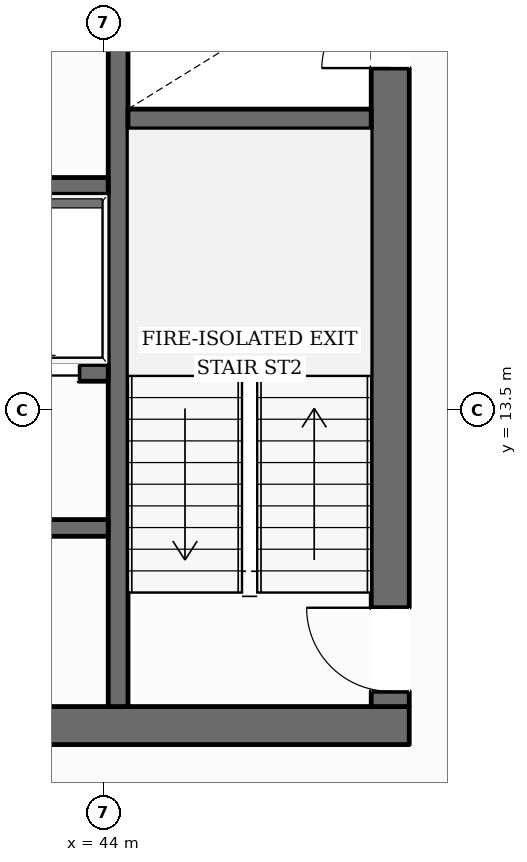
"""IFC4 building model, lengths in metres.
Left out: names, types, materials, properties, quantities, classifications, styles, units other than length and angle.
Written with IfcOpenShell. Run it as: python <this file> out.ifc"""

import sys

from ifc_helpers import new_model, si_unit, direction, frame, frame_2d, origin, place, context, subcontext, project, spatial, rectangle, extrude, element, fill, save


model = new_model("IFC4")
c1 = context("Model", 3, precision=1e-05, world=origin(), true_north=direction((0.0, 1.0)))
c2 = subcontext(c1, "Body", "Model", "MODEL_VIEW")
j1 = project(units=[si_unit("LENGTHUNIT", "METRE"), si_unit("PLANEANGLEUNIT", "RADIAN")], contexts=[c1])
p1 = place(None, origin())
s1 = spatial("IfcSite", under=j1, at=p1, CompositionType="ELEMENT")
p2 = place(p1, origin())
s2 = spatial("IfcBuilding", under=s1, at=p2, CompositionType="ELEMENT")
p3 = place(p2, frame((0.0, 0.0, 108.6)))
s3 = spatial("IfcBuildingStorey", under=s2, at=p3, CompositionType="ELEMENT", Elevation=108.6)
p4 = place(p3, frame((27.98, 9.35, 0.0), z_axis=(0.0, 0.0, 1.0), x_axis=(1.0, 0.0, 0.0)))
e1 = element("IfcWall", 1, at=p4, inside=s3, PredefinedType="SOLIDWALL", context=c2, shape_type="SweptSolid", body=[
    extrude(rectangle(XDim=20.04, YDim=0.5, at=frame_2d((10.02, 0.0))), origin(), (0.0, 0.0, 1.0), 3.6),
])
p5 = place(p4, frame((10.52, 0.0, 0.0)))
e2 = element("IfcOpeningElement", 2, at=p5, cuts=e1, PredefinedType="OPENING", context=c2, shape_type="SweptSolid", body=[
    extrude(rectangle(XDim=1.4, YDim=2.2, at=frame_2d((0.7, 1.1))), frame((0.0, 0.26, 0.0), z_axis=(0.0, -1.0, 0.0), x_axis=(1.0, 0.0, 0.0)), (0.0, 0.0, 1.0), 0.52),
])
p6 = place(p3, frame((47.77, 9.6, 0.0), z_axis=(0.0, 0.0, 1.0), x_axis=(0.0, 1.0, 0.0)))
e3 = element("IfcWall", 3, at=p6, inside=s3, PredefinedType="SOLIDWALL", context=c2, shape_type="SweptSolid", body=[
    extrude(rectangle(XDim=13.0, YDim=0.5, at=frame_2d((6.5, 0.0))), origin(), (0.0, 0.0, 1.0), 3.6),
])
p7 = place(p6, frame((0.2, 0.0, 0.0)))
e4 = element("IfcOpeningElement", 4, at=p7, cuts=e3, PredefinedType="OPENING", context=c2, shape_type="SweptSolid", body=[
    extrude(rectangle(XDim=1.1, YDim=2.15, at=frame_2d((0.55, 1.075))), frame((0.0, 0.26, 0.0), z_axis=(0.0, -1.0, 0.0), x_axis=(1.0, 0.0, 0.0)), (0.0, 0.0, 1.0), 0.52),
])
p8 = place(p6, frame((8.4, 0.0, 0.0)))
e5 = element("IfcOpeningElement", 5, at=p8, cuts=e3, PredefinedType="OPENING", context=c2, shape_type="SweptSolid", body=[
    extrude(rectangle(XDim=0.9, YDim=2.1, at=frame_2d((0.45, 1.05))), frame((0.0, 0.26, 0.0), z_axis=(0.0, -1.0, 0.0), x_axis=(1.0, 0.0, 0.0)), (0.0, 0.0, 1.0), 0.52),
])
p9 = place(p3, frame((44.19, 9.6, 0.0), z_axis=(0.0, 0.0, 1.0), x_axis=(0.0, 1.0, 0.0)))
e6 = element("IfcWall", 6, at=p9, inside=s3, PredefinedType="SHEAR", context=c2, shape_type="SweptSolid", body=[
    extrude(rectangle(XDim=13.0, YDim=0.26, at=frame_2d((6.5, 0.0))), origin(), (0.0, 0.0, 1.0), 3.6),
])
p10 = place(p9, frame((10.925, 0.0, 0.0)))
e7 = element("IfcOpeningElement", 7, at=p10, cuts=e6, PredefinedType="OPENING", context=c2, shape_type="SweptSolid", body=[
    extrude(rectangle(XDim=1.25, YDim=2.25, at=frame_2d((0.625, 1.125))), frame((0.0, 0.14, 0.0), z_axis=(0.0, -1.0, 0.0), x_axis=(1.0, 0.0, 0.0)), (0.0, 0.0, 1.0), 0.28),
])
p11 = place(p3, frame((44.32, 17.33, 0.0), z_axis=(0.0, 0.0, 1.0), x_axis=(1.0, 0.0, 0.0)))
e8 = element("IfcWall", 8, at=p11, inside=s3, PredefinedType="SHEAR", context=c2, shape_type="SweptSolid", body=[
    extrude(rectangle(XDim=3.2, YDim=0.26, at=frame_2d((1.6, 0.0))), origin(), (0.0, 0.0, 1.0), 3.6),
])
p12 = place(p3, frame((31.94, 16.45, 0.0), z_axis=(0.0, 0.0, 1.0), x_axis=(1.0, 0.0, 0.0)))
e9 = element("IfcWall", 9, at=p12, inside=s3, PredefinedType="SOLIDWALL", context=c2, shape_type="SweptSolid", body=[
    extrude(rectangle(XDim=12.12, YDim=0.22, at=frame_2d((6.06, 0.0))), origin(), (0.0, 0.0, 1.0), 3.6),
])
p13 = place(p3, frame((31.94, 13.99, 0.0), z_axis=(0.0, 0.0, 1.0), x_axis=(1.0, 0.0, 0.0)))
e10 = element("IfcWall", 10, at=p13, inside=s3, PredefinedType="SOLIDWALL", context=c2, shape_type="SweptSolid", body=[
    extrude(rectangle(XDim=12.12, YDim=0.22, at=frame_2d((6.06, 0.0))), origin(), (0.0, 0.0, 1.0), 3.6),
])
p14 = place(p13, frame((1.21, 0.0, 0.0)))
e11 = element("IfcOpeningElement", 11, at=p14, cuts=e10, PredefinedType="OPENING", context=c2, shape_type="SweptSolid", body=[
    extrude(rectangle(XDim=0.9, YDim=2.1, at=frame_2d((0.45, 1.05))), frame((0.0, 0.12, 0.0), z_axis=(0.0, -1.0, 0.0), x_axis=(1.0, 0.0, 0.0)), (0.0, 0.0, 1.0), 0.24),
])
p15 = place(p13, frame((4.31, 0.0, 0.0)))
e12 = element("IfcOpeningElement", 12, at=p15, cuts=e10, PredefinedType="OPENING", context=c2, shape_type="SweptSolid", body=[
    extrude(rectangle(XDim=0.9, YDim=2.1, at=frame_2d((0.45, 1.05))), frame((0.0, 0.12, 0.0), z_axis=(0.0, -1.0, 0.0), x_axis=(1.0, 0.0, 0.0)), (0.0, 0.0, 1.0), 0.24),
])
p16 = place(p13, frame((6.535, 0.0, 0.0)))
e13 = element("IfcOpeningElement", 13, at=p16, cuts=e10, PredefinedType="OPENING", context=c2, shape_type="SweptSolid", body=[
    extrude(rectangle(XDim=1.1, YDim=2.2, at=frame_2d((0.55, 1.1))), frame((0.0, 0.12, 0.0), z_axis=(0.0, -1.0, 0.0), x_axis=(1.0, 0.0, 0.0)), (0.0, 0.0, 1.0), 0.24),
])
p17 = place(p13, frame((8.585, 0.0, 0.0)))
e14 = element("IfcOpeningElement", 14, at=p17, cuts=e10, PredefinedType="OPENING", context=c2, shape_type="SweptSolid", body=[
    extrude(rectangle(XDim=1.1, YDim=2.2, at=frame_2d((0.55, 1.1))), frame((0.0, 0.12, 0.0), z_axis=(0.0, -1.0, 0.0), x_axis=(1.0, 0.0, 0.0)), (0.0, 0.0, 1.0), 0.24),
])
p18 = place(p13, frame((10.635, 0.0, 0.0)))
e15 = element("IfcOpeningElement", 15, at=p18, cuts=e10, PredefinedType="OPENING", context=c2, shape_type="SweptSolid", body=[
    extrude(rectangle(XDim=1.1, YDim=2.2, at=frame_2d((0.55, 1.1))), frame((0.0, 0.12, 0.0), z_axis=(0.0, -1.0, 0.0), x_axis=(1.0, 0.0, 0.0)), (0.0, 0.0, 1.0), 0.24),
])
p19 = place(p3, frame((40.28, 11.95, 0.0), z_axis=(0.0, 0.0, 1.0), x_axis=(1.0, 0.0, 0.0)))
e16 = element("IfcWall", 16, at=p19, inside=s3, PredefinedType="SOLIDWALL", context=c2, shape_type="SweptSolid", body=[
    extrude(rectangle(XDim=3.78, YDim=0.22, at=frame_2d((1.89, 0.0))), origin(), (0.0, 0.0, 1.0), 3.6),
])
p20 = place(p19, frame((1.55, 0.0, 0.0)))
e17 = element("IfcOpeningElement", 17, at=p20, cuts=e16, PredefinedType="OPENING", context=c2, shape_type="SweptSolid", body=[
    extrude(rectangle(XDim=0.9, YDim=2.1, at=frame_2d((0.45, 1.05))), frame((0.0, 0.12, 0.0), z_axis=(0.0, -1.0, 0.0), x_axis=(1.0, 0.0, 0.0)), (0.0, 0.0, 1.0), 0.24),
])
p21 = place(p3, frame((44.12, 44.689, 0.0), z_axis=(0.0, 0.0, 1.0), x_axis=(0.498376840975, -0.866960509124, 0.0)))
e18 = element("IfcWall", 18, at=p21, inside=s3, PredefinedType="STANDARD", context=c2, shape_type="SweptSolid", body=[
    extrude(rectangle(XDim=36.441, YDim=0.38, at=frame_2d((18.22, 0.0))), origin(), (0.0, 0.0, 1.0), 3.059),
])
p22 = place(p21, frame((32.234, 0.0, 0.65)))
e19 = element("IfcOpeningElement", 19, at=p22, cuts=e18, PredefinedType="OPENING", context=c2, shape_type="SweptSolid", body=[
    extrude(rectangle(XDim=1.55, YDim=1.75, at=frame_2d((0.775, 0.875))), frame((0.0, 0.2, 0.0), z_axis=(0.0, -1.0, 0.0), x_axis=(1.0, 0.0, 0.0)), (0.0, 0.0, 1.0), 0.4),
])
p23 = place(p21, frame((26.319, 0.0, 0.65)))
e20 = element("IfcOpeningElement", 20, at=p23, cuts=e18, PredefinedType="OPENING", context=c2, shape_type="SweptSolid", body=[
    extrude(rectangle(XDim=1.55, YDim=1.75, at=frame_2d((0.775, 0.875))), frame((0.0, 0.2, 0.0), z_axis=(0.0, -1.0, 0.0), x_axis=(1.0, 0.0, 0.0)), (0.0, 0.0, 1.0), 0.4),
])
p24 = place(p21, frame((14.489, 0.0, 0.65)))
e21 = element("IfcOpeningElement", 21, at=p24, cuts=e18, PredefinedType="OPENING", context=c2, shape_type="SweptSolid", body=[
    extrude(rectangle(XDim=1.55, YDim=1.75, at=frame_2d((0.775, 0.875))), frame((0.0, 0.2, 0.0), z_axis=(0.0, -1.0, 0.0), x_axis=(1.0, 0.0, 0.0)), (0.0, 0.0, 1.0), 0.4),
])
p25 = place(p21, frame((8.573, 0.0, 0.65)))
e22 = element("IfcOpeningElement", 22, at=p25, cuts=e18, PredefinedType="OPENING", context=c2, shape_type="SweptSolid", body=[
    extrude(rectangle(XDim=1.55, YDim=1.75, at=frame_2d((0.775, 0.875))), frame((0.0, 0.2, 0.0), z_axis=(0.0, -1.0, 0.0), x_axis=(1.0, 0.0, 0.0)), (0.0, 0.0, 1.0), 0.4),
])
p26 = place(p21, frame((2.658, 0.0, 0.65)))
e23 = element("IfcOpeningElement", 23, at=p26, cuts=e18, PredefinedType="OPENING", context=c2, shape_type="SweptSolid", body=[
    extrude(rectangle(XDim=1.55, YDim=1.75, at=frame_2d((0.775, 0.875))), frame((0.0, 0.2, 0.0), z_axis=(0.0, -1.0, 0.0), x_axis=(1.0, 0.0, 0.0)), (0.0, 0.0, 1.0), 0.4),
])
p27 = place(p7, origin())
e24 = element("IfcDoor", 24, at=p27, inside=s3, OperationType="SINGLE_SWING_RIGHT", PredefinedType="DOOR", context=c2, shape_type="SweptSolid", body=[
    extrude(rectangle(XDim=1.1, YDim=2.15, at=frame_2d((0.55, 1.075))), frame((0.0, 0.025, 0.0), z_axis=(0.0, -1.0, 0.0), x_axis=(1.0, 0.0, 0.0)), (0.0, 0.0, 1.0), 0.05),
])
fill(e4, e24)
p28 = place(p8, origin())
e25 = element("IfcDoor", 25, at=p28, inside=s3, OperationType="SINGLE_SWING_LEFT", PredefinedType="DOOR", context=c2, shape_type="SweptSolid", body=[
    extrude(rectangle(XDim=0.9, YDim=2.1, at=frame_2d((0.45, 1.05))), frame((0.0, 0.025, 0.0), z_axis=(0.0, -1.0, 0.0), x_axis=(1.0, 0.0, 0.0)), (0.0, 0.0, 1.0), 0.05),
])
fill(e5, e25)
p29 = place(p18, origin())
e26 = element("IfcDoor", 26, at=p29, inside=s3, OperationType="DOUBLE_DOOR_SLIDING", PredefinedType="DOOR", context=c2, shape_type="SweptSolid", body=[
    extrude(rectangle(XDim=1.1, YDim=2.2, at=frame_2d((0.55, 1.1))), frame((0.0, 0.025, 0.0), z_axis=(0.0, -1.0, 0.0), x_axis=(1.0, 0.0, 0.0)), (0.0, 0.0, 1.0), 0.05),
])
fill(e15, e26)
save(model, sys.argv[1])
